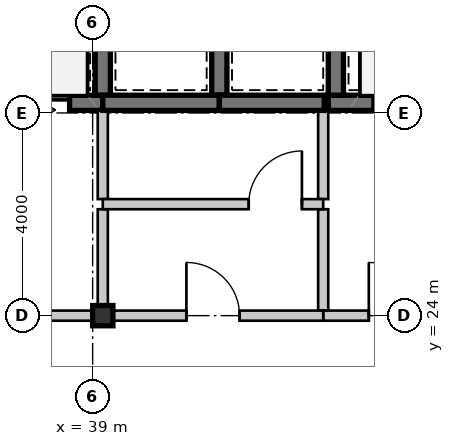
"""IFC4 building model, lengths in metres.
Left out: names, types, materials, properties, quantities, classifications, styles, units other than length and angle.
Written with IfcOpenShell. Run it as: python <this file> out.ifc"""

import sys

from ifc_helpers import new_model, si_unit, direction, frame, frame_2d, origin, origin_2d, place, context, subcontext, project, spatial, rectangle, hollow_rectangle, extrude, source, transform, mapped, element, fill, save


model = new_model("IFC4")
c1 = context("Model", 3, precision=1e-05, world=origin(), true_north=direction((0.0, 1.0)))
c2 = subcontext(c1, "Body", "Model", "MODEL_VIEW")
j1 = project(units=[si_unit("LENGTHUNIT", "METRE"), si_unit("PLANEANGLEUNIT", "RADIAN")], contexts=[c1])
p1 = place(None, origin())
s1 = spatial("IfcSite", under=j1, at=p1, CompositionType="ELEMENT")
p2 = place(p1, origin())
s2 = spatial("IfcBuilding", under=s1, at=p2, CompositionType="ELEMENT")
p3 = place(p2, frame((0.0, 0.0, 126.7)))
s3 = spatial("IfcBuildingStorey", under=s2, at=p3, CompositionType="ELEMENT", Elevation=126.7)
m1 = source(origin(), c2, "Body", "SweptSolid", [
    extrude(hollow_rectangle(XDim=0.4, YDim=0.4, WallThickness=0.016, at=origin_2d()), origin(), (0.0, 0.0, 1.0), 3.15),
])
p4 = place(p3, frame((39.2, 24.0, 0.0), z_axis=(0.0, 0.0, 1.0), x_axis=(1.0, 0.0, 0.0)))
e1 = element("IfcColumn", 1, at=p4, inside=s3, PredefinedType="COLUMN", context=c2, shape_type="MappedRepresentation", body=[
    mapped(m1, transform((0.0, 0.0, 0.0), scale=1.0)),
])
m2 = source(origin(), c2, "Body", "SweptSolid", [
    extrude(rectangle(XDim=2.9, YDim=0.3, at=frame_2d((1.45, 0.0))), origin(), (0.0, 0.0, 1.0), 2.93),
])
p5 = place(p3, frame((43.65, 28.2, 0.0), z_axis=(0.0, 0.0, 1.0), x_axis=(1.0, 0.0, 0.0)))
e2 = element("IfcWall", 2, at=p5, inside=s3, PredefinedType="SHEAR", context=c2, shape_type="MappedRepresentation", body=[
    mapped(m2, transform((0.0, 0.0, 0.0), scale=1.0)),
])
m3 = source(origin(), c2, "Body", "SweptSolid", [
    extrude(rectangle(XDim=1.1, YDim=2.15, at=frame_2d((0.55, 1.075))), frame((0.0, 0.16, 0.0), z_axis=(0.0, -1.0, 0.0), x_axis=(1.0, 0.0, 0.0)), (0.0, 0.0, 1.0), 0.32),
])
p6 = place(p5, frame((0.9, 0.0, 0.0)))
e3 = element("IfcOpeningElement", 3, at=p6, cuts=e2, PredefinedType="OPENING", context=c2, shape_type="MappedRepresentation", body=[
    mapped(m3, transform((0.0, 0.0, 0.0), scale=1.0)),
])
m4 = source(origin(), c2, "Body", "SweptSolid", [
    extrude(rectangle(XDim=3.5, YDim=0.3, at=frame_2d((1.75, 0.0))), origin(), (0.0, 0.0, 1.0), 2.93),
])
p7 = place(p3, frame((43.8, 31.85, 0.0), z_axis=(0.0, 0.0, 1.0), x_axis=(0.0, -1.0, 0.0)))
e4 = element("IfcWall", 4, at=p7, inside=s3, PredefinedType="SHEAR", context=c2, shape_type="MappedRepresentation", body=[
    mapped(m4, transform((0.0, 0.0, 0.0), scale=1.0)),
])
m5 = source(origin(), c2, "Body", "SweptSolid", [
    extrude(rectangle(XDim=2.0, YDim=0.2, at=frame_2d((1.0, 0.0))), origin(), (0.0, 0.0, 1.0), 2.93),
])
p8 = place(p3, frame((43.55, 26.1, 0.0), z_axis=(0.0, 0.0, 1.0), x_axis=(0.0, -1.0, 0.0)))
e5 = element("IfcWall", 5, at=p8, inside=s3, PredefinedType="SOLIDWALL", context=c2, shape_type="MappedRepresentation", body=[
    mapped(m5, transform((0.0, 0.0, 0.0), scale=1.0)),
])
m6 = source(origin(), c2, "Body", "SweptSolid", [
    extrude(rectangle(XDim=1.75, YDim=0.2, at=frame_2d((0.875, 0.0))), origin(), (0.0, 0.0, 1.0), 2.93),
])
p9 = place(p3, frame((43.55, 28.05, 0.0), z_axis=(0.0, 0.0, 1.0), x_axis=(0.0, -1.0, 0.0)))
e6 = element("IfcWall", 6, at=p9, inside=s3, PredefinedType="SOLIDWALL", context=c2, shape_type="MappedRepresentation", body=[
    mapped(m6, transform((0.0, 0.0, 0.0), scale=1.0)),
])
m7 = source(origin(), c2, "Body", "SweptSolid", [
    extrude(rectangle(XDim=2.7, YDim=0.2, at=frame_2d((1.35, 0.0))), origin(), (0.0, 0.0, 1.0), 2.397),
])
p10 = place(p3, frame((43.55, 24.0, 0.0), z_axis=(0.0, 0.0, 1.0), x_axis=(1.0, 0.0, 0.0)))
e7 = element("IfcWall", 7, at=p10, inside=s3, PredefinedType="SOLIDWALL", context=c2, shape_type="MappedRepresentation", body=[
    mapped(m7, transform((0.0, 0.0, 0.0), scale=1.0)),
])
m8 = source(origin(), c2, "Body", "SweptSolid", [
    extrude(rectangle(XDim=1.05, YDim=2.1, at=frame_2d((0.525, 1.05))), frame((0.0, 0.11, 0.0), z_axis=(0.0, -1.0, 0.0), x_axis=(1.0, 0.0, 0.0)), (0.0, 0.0, 1.0), 0.22),
])
p11 = place(p10, frame((0.9, 0.0, 0.0)))
e8 = element("IfcOpeningElement", 8, at=p11, cuts=e7, PredefinedType="OPENING", context=c2, shape_type="MappedRepresentation", body=[
    mapped(m8, transform((0.0, 0.0, 0.0), scale=1.0)),
])
m9 = source(origin(), c2, "Body", "SweptSolid", [
    extrude(rectangle(XDim=2.5, YDim=0.3, at=frame_2d((1.25, 0.0))), origin(), (0.0, 0.0, 1.0), 2.93),
])
p12 = place(p3, frame((36.7, 28.2, 0.0), z_axis=(0.0, 0.0, 1.0), x_axis=(1.0, 0.0, 0.0)))
e9 = element("IfcWall", 9, at=p12, inside=s3, PredefinedType="SHEAR", context=c2, shape_type="MappedRepresentation", body=[
    mapped(m9, transform((0.0, 0.0, 0.0), scale=1.0)),
])
m10 = source(origin(), c2, "Body", "SweptSolid", [
    extrude(rectangle(XDim=1.05, YDim=2.15, at=frame_2d((0.525, 1.075))), frame((0.0, 0.16, 0.0), z_axis=(0.0, -1.0, 0.0), x_axis=(1.0, 0.0, 0.0)), (0.0, 0.0, 1.0), 0.32),
])
p13 = place(p12, frame((0.795, 0.0, 0.0)))
e10 = element("IfcOpeningElement", 10, at=p13, cuts=e9, PredefinedType="OPENING", context=c2, shape_type="MappedRepresentation", body=[
    mapped(m10, transform((0.0, 0.0, 0.0), scale=1.0)),
])
p14 = place(p3, frame((39.2, 28.35, 0.0), z_axis=(0.0, 0.0, 1.0), x_axis=(0.0, 1.0, 0.0)))
e11 = element("IfcWall", 11, at=p14, inside=s3, PredefinedType="SHEAR", context=c2, shape_type="MappedRepresentation", body=[
    mapped(m4, transform((0.0, 0.0, 0.0), scale=1.0)),
])
m11 = source(origin(), c2, "Body", "SweptSolid", [
    extrude(rectangle(XDim=2.0, YDim=0.2, at=frame_2d((1.0, 0.0))), origin(), (0.0, 0.0, 1.0), 2.47),
])
p15 = place(p3, frame((39.2, 26.1, 0.0), z_axis=(0.0, 0.0, 1.0), x_axis=(0.0, -1.0, 0.0)))
e12 = element("IfcWall", 12, at=p15, inside=s3, PredefinedType="SOLIDWALL", context=c2, shape_type="MappedRepresentation", body=[
    mapped(m11, transform((0.0, 0.0, 0.0), scale=1.0)),
])
m12 = source(origin(), c2, "Body", "SweptSolid", [
    extrude(rectangle(XDim=1.75, YDim=0.2, at=frame_2d((0.875, 0.0))), origin(), (0.0, 0.0, 1.0), 2.47),
])
p16 = place(p3, frame((39.2, 28.05, 0.0), z_axis=(0.0, 0.0, 1.0), x_axis=(0.0, -1.0, 0.0)))
e13 = element("IfcWall", 13, at=p16, inside=s3, PredefinedType="SOLIDWALL", context=c2, shape_type="MappedRepresentation", body=[
    mapped(m12, transform((0.0, 0.0, 0.0), scale=1.0)),
])
m13 = source(origin(), c2, "Body", "SweptSolid", [
    extrude(rectangle(XDim=6.35, YDim=0.2, at=frame_2d((3.175, 0.0))), origin(), (0.0, 0.0, 1.0), 2.47),
])
p17 = place(p3, frame((39.2, 24.0, 0.0), z_axis=(0.0, 0.0, 1.0), x_axis=(-1.0, 0.0, 0.0)))
e14 = element("IfcWall", 14, at=p17, inside=s3, PredefinedType="SOLIDWALL", context=c2, shape_type="MappedRepresentation", body=[
    mapped(m13, transform((0.0, 0.0, 0.0), scale=1.0)),
])
p18 = place(p17, frame((2.65, 0.0, 0.0)))
e15 = element("IfcOpeningElement", 15, at=p18, cuts=e14, PredefinedType="OPENING", context=c2, shape_type="MappedRepresentation", body=[
    mapped(m8, transform((0.0, 0.0, 0.0), scale=1.0)),
])
p19 = place(p3, frame((41.5, 28.35, 0.0), z_axis=(0.0, 0.0, 1.0), x_axis=(0.0, 1.0, 0.0)))
e16 = element("IfcWall", 16, at=p19, inside=s3, PredefinedType="SHEAR", context=c2, shape_type="MappedRepresentation", body=[
    mapped(m4, transform((0.0, 0.0, 0.0), scale=1.0)),
])
m14 = source(origin(), c2, "Body", "SweptSolid", [
    extrude(rectangle(XDim=2.3, YDim=0.3, at=frame_2d((1.15, 0.0))), origin(), (0.0, 0.0, 1.0), 2.93),
])
p20 = place(p3, frame((39.2, 28.2, 0.0), z_axis=(0.0, 0.0, 1.0), x_axis=(1.0, 0.0, 0.0)))
e17 = element("IfcWall", 17, at=p20, inside=s3, PredefinedType="SHEAR", context=c2, shape_type="MappedRepresentation", body=[
    mapped(m14, transform((0.0, 0.0, 0.0), scale=1.0)),
])
m15 = source(origin(), c2, "Body", "SweptSolid", [
    extrude(rectangle(XDim=2.07, YDim=0.3, at=frame_2d((1.035, 0.0))), origin(), (0.0, 0.0, 1.0), 2.93),
])
p21 = place(p3, frame((41.5, 28.2, 0.0), z_axis=(0.0, 0.0, 1.0), x_axis=(1.0, 0.0, 0.0)))
e18 = element("IfcWall", 18, at=p21, inside=s3, PredefinedType="SHEAR", context=c2, shape_type="MappedRepresentation", body=[
    mapped(m15, transform((0.0, 0.0, 0.0), scale=1.0)),
])
m16 = source(origin(), c2, "Body", "SweptSolid", [
    extrude(rectangle(XDim=4.35, YDim=0.2, at=frame_2d((2.175, 0.0))), origin(), (0.0, 0.0, 1.0), 2.93),
])
p22 = place(p3, frame((39.2, 26.2, 0.0), z_axis=(0.0, 0.0, 1.0), x_axis=(1.0, 0.0, 0.0)))
e19 = element("IfcWall", 19, at=p22, inside=s3, PredefinedType="SOLIDWALL", context=c2, shape_type="MappedRepresentation", body=[
    mapped(m16, transform((0.0, 0.0, 0.0), scale=1.0)),
])
p23 = place(p22, frame((2.88, 0.0, 0.0)))
e20 = element("IfcOpeningElement", 20, at=p23, cuts=e19, PredefinedType="OPENING", context=c2, shape_type="MappedRepresentation", body=[
    mapped(m8, transform((0.0, 0.0, 0.0), scale=1.0)),
])
m17 = source(origin(), c2, "Body", "SweptSolid", [
    extrude(rectangle(XDim=4.35, YDim=0.2, at=frame_2d((2.175, 0.0))), origin(), (0.0, 0.0, 1.0), 2.397),
])
p24 = place(p3, frame((43.55, 24.0, 0.0), z_axis=(0.0, 0.0, 1.0), x_axis=(-1.0, 0.0, 0.0)))
e21 = element("IfcWall", 21, at=p24, inside=s3, PredefinedType="SOLIDWALL", context=c2, shape_type="MappedRepresentation", body=[
    mapped(m17, transform((0.0, 0.0, 0.0), scale=1.0)),
])
p25 = place(p24, frame((1.65, 0.0, 0.0)))
e22 = element("IfcOpeningElement", 22, at=p25, cuts=e21, PredefinedType="OPENING", context=c2, shape_type="MappedRepresentation", body=[
    mapped(m8, transform((0.0, 0.0, 0.0), scale=1.0)),
])
m18 = source(origin(), c2, "Body", "SweptSolid", [
    extrude(rectangle(XDim=1.1, YDim=2.15, at=frame_2d((0.55, 1.075))), frame((0.0, 0.025, 0.0), z_axis=(0.0, -1.0, 0.0), x_axis=(1.0, 0.0, 0.0)), (0.0, 0.0, 1.0), 0.05),
])
p26 = place(p6, origin())
e23 = element("IfcDoor", 23, at=p26, inside=s3, OperationType="SLIDING_TO_LEFT", PredefinedType="DOOR", context=c2, shape_type="MappedRepresentation", body=[
    mapped(m18, transform((0.0, 0.0, 0.0), scale=1.0)),
])
fill(e3, e23)
m19 = source(origin(), c2, "Body", "SweptSolid", [
    extrude(rectangle(XDim=1.05, YDim=2.1, at=frame_2d((0.525, 1.05))), frame((0.0, 0.025, 0.0), z_axis=(0.0, -1.0, 0.0), x_axis=(1.0, 0.0, 0.0)), (0.0, 0.0, 1.0), 0.05),
])
p27 = place(p11, origin())
e24 = element("IfcDoor", 24, at=p27, inside=s3, OperationType="SINGLE_SWING_LEFT", PredefinedType="DOOR", context=c2, shape_type="MappedRepresentation", body=[
    mapped(m19, transform((0.0, 0.0, 0.0), scale=1.0)),
])
fill(e8, e24)
m20 = source(origin(), c2, "Body", "SweptSolid", [
    extrude(rectangle(XDim=1.05, YDim=2.15, at=frame_2d((0.525, 1.075))), frame((0.0, 0.025, 0.0), z_axis=(0.0, -1.0, 0.0), x_axis=(1.0, 0.0, 0.0)), (0.0, 0.0, 1.0), 0.05),
])
p28 = place(p13, origin())
e25 = element("IfcDoor", 25, at=p28, inside=s3, OperationType="SLIDING_TO_LEFT", PredefinedType="DOOR", context=c2, shape_type="MappedRepresentation", body=[
    mapped(m20, transform((0.0, 0.0, 0.0), scale=1.0)),
])
fill(e10, e25)
p29 = place(p23, origin())
e26 = element("IfcDoor", 26, at=p29, inside=s3, OperationType="SINGLE_SWING_RIGHT", PredefinedType="DOOR", context=c2, shape_type="MappedRepresentation", body=[
    mapped(m19, transform((0.0, 0.0, 0.0), scale=1.0)),
])
fill(e20, e26)
p30 = place(p25, frame((1.05, 0.0, 0.0), z_axis=(0.0, 0.0, 1.0), x_axis=(-1.0, 0.0, 0.0)))
e27 = element("IfcDoor", 27, at=p30, inside=s3, OperationType="SINGLE_SWING_LEFT", PredefinedType="DOOR", context=c2, shape_type="MappedRepresentation", body=[
    mapped(m19, transform((0.0, 0.0, 0.0), scale=1.0)),
])
fill(e22, e27)
save(model, sys.argv[1])
